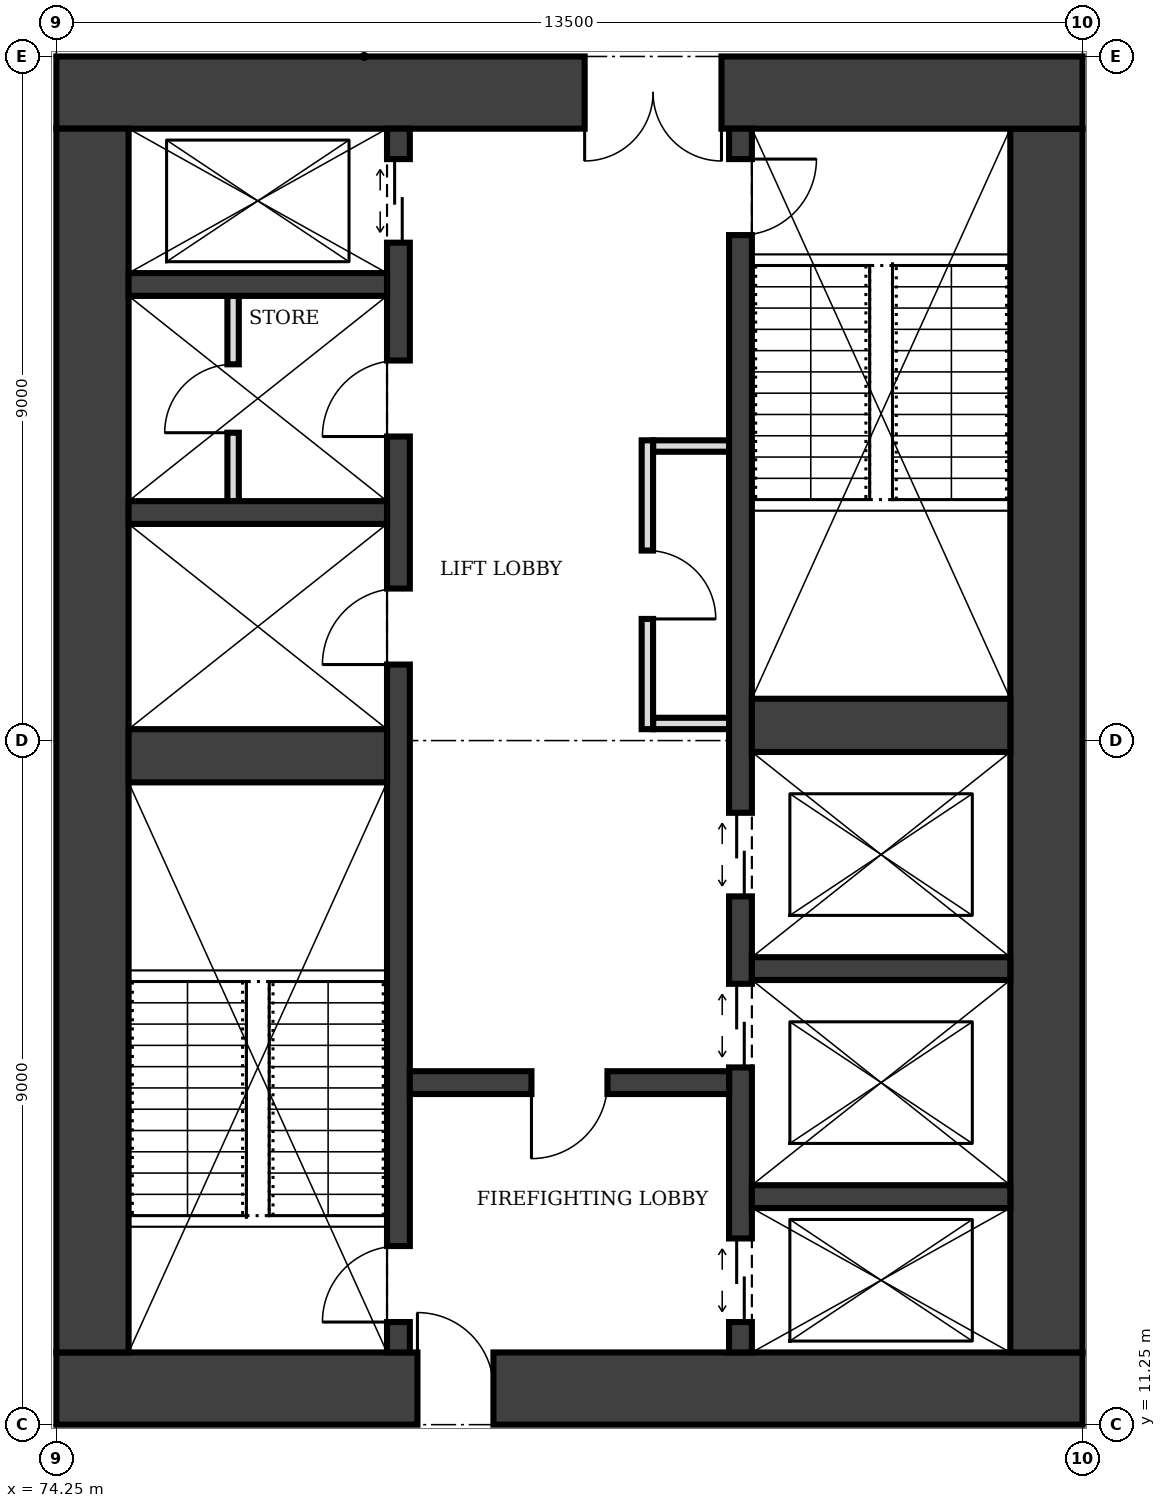
"""IFC4 building model, lengths in metres.
Left out: names, types, materials, properties, quantities, classifications, styles, units other than length and angle.
Written with IfcOpenShell. Run it as: python <this file> out.ifc"""

import sys

from ifc_helpers import new_model, si_unit, direction, frame, frame_2d, origin, place, context, subcontext, project, spatial, rectangle, extrude, element, fill, save


model = new_model("IFC4")
c1 = context("Model", 3, precision=1e-05, world=origin(), true_north=direction((0.0, 1.0)))
c2 = subcontext(c1, "Body", "Model", "MODEL_VIEW")
j1 = project(units=[si_unit("LENGTHUNIT", "METRE"), si_unit("PLANEANGLEUNIT", "RADIAN")], contexts=[c1])
p1 = place(None, origin())
s1 = spatial("IfcSite", under=j1, at=p1, CompositionType="ELEMENT")
p2 = place(p1, origin())
s2 = spatial("IfcBuilding", under=s1, at=p2, CompositionType="ELEMENT")
p3 = place(p2, frame((0.0, 0.0, 205.0)))
s3 = spatial("IfcBuildingStorey", under=s2, at=p3, CompositionType="ELEMENT", Elevation=205.0)
p4 = place(p3, frame((74.25, 11.725, 0.0), z_axis=(0.0, 0.0, 1.0), x_axis=(1.0, 0.0, 0.0)))
e1 = element("IfcWall", 1, at=p4, inside=s3, PredefinedType="SHEAR", context=c2, shape_type="SweptSolid", body=[
    extrude(rectangle(XDim=13.5, YDim=0.95, at=frame_2d((6.75, 0.0))), origin(), (0.0, 0.0, 1.0), 4.0),
])
p5 = place(p4, frame((4.75, 0.0, 0.0)))
e2 = element("IfcOpeningElement", 2, at=p5, cuts=e1, PredefinedType="OPENING", context=c2, shape_type="SweptSolid", body=[
    extrude(rectangle(XDim=1.0, YDim=2.1, at=frame_2d((0.5, 1.05))), frame((0.0, 0.485, 0.0), z_axis=(0.0, -1.0, 0.0), x_axis=(1.0, 0.0, 0.0)), (0.0, 0.0, 1.0), 0.97),
])
p6 = place(p3, frame((87.275, 12.2, 0.0), z_axis=(0.0, 0.0, 1.0), x_axis=(0.0, 1.0, 0.0)))
e3 = element("IfcWall", 3, at=p6, inside=s3, PredefinedType="SHEAR", context=c2, shape_type="SweptSolid", body=[
    extrude(rectangle(XDim=16.1, YDim=0.95, at=frame_2d((8.05, 0.0))), origin(), (0.0, 0.0, 1.0), 4.0),
])
p7 = place(p3, frame((87.75, 28.775, 0.0), z_axis=(0.0, 0.0, 1.0), x_axis=(-1.0, 0.0, 0.0)))
e4 = element("IfcWall", 4, at=p7, inside=s3, PredefinedType="SHEAR", context=c2, shape_type="SweptSolid", body=[
    extrude(rectangle(XDim=13.5, YDim=0.95, at=frame_2d((6.75, 0.0))), origin(), (0.0, 0.0, 1.0), 4.0),
])
p8 = place(p7, frame((4.75, 0.0, 0.0)))
e5 = element("IfcOpeningElement", 5, at=p8, cuts=e4, PredefinedType="OPENING", context=c2, shape_type="SweptSolid", body=[
    extrude(rectangle(XDim=1.8, YDim=2.1, at=frame_2d((0.9, 1.05))), frame((0.0, 0.485, 0.0), z_axis=(0.0, -1.0, 0.0), x_axis=(1.0, 0.0, 0.0)), (0.0, 0.0, 1.0), 0.97),
])
p9 = place(p3, frame((74.725, 28.3, 0.0), z_axis=(0.0, 0.0, 1.0), x_axis=(0.0, -1.0, 0.0)))
e6 = element("IfcWall", 6, at=p9, inside=s3, PredefinedType="SHEAR", context=c2, shape_type="SweptSolid", body=[
    extrude(rectangle(XDim=16.1, YDim=0.95, at=frame_2d((8.05, 0.0))), origin(), (0.0, 0.0, 1.0), 4.0),
])
p10 = place(p3, frame((78.75, 12.2, 0.0), z_axis=(0.0, 0.0, 1.0), x_axis=(0.0, 1.0, 0.0)))
e7 = element("IfcWall", 7, at=p10, inside=s3, PredefinedType="SHEAR", context=c2, shape_type="SweptSolid", body=[
    extrude(rectangle(XDim=16.1, YDim=0.3, at=frame_2d((8.05, 0.0))), origin(), (0.0, 0.0, 1.0), 4.0),
])
p11 = place(p10, frame((0.4, 0.0, 0.0)))
e8 = element("IfcOpeningElement", 8, at=p11, cuts=e7, PredefinedType="OPENING", context=c2, shape_type="SweptSolid", body=[
    extrude(rectangle(XDim=1.0, YDim=2.1, at=frame_2d((0.5, 1.05))), frame((0.0, 0.16, 0.0), z_axis=(0.0, -1.0, 0.0), x_axis=(1.0, 0.0, 0.0)), (0.0, 0.0, 1.0), 0.32),
])
p12 = place(p10, frame((14.6, 0.0, 0.0)))
e9 = element("IfcOpeningElement", 9, at=p12, cuts=e7, PredefinedType="OPENING", context=c2, shape_type="SweptSolid", body=[
    extrude(rectangle(XDim=1.1, YDim=2.1, at=frame_2d((0.55, 1.05))), frame((0.0, 0.16, 0.0), z_axis=(0.0, -1.0, 0.0), x_axis=(1.0, 0.0, 0.0)), (0.0, 0.0, 1.0), 0.32),
])
p13 = place(p10, frame((9.05, 0.0, 0.0)))
e10 = element("IfcOpeningElement", 10, at=p13, cuts=e7, PredefinedType="OPENING", context=c2, shape_type="SweptSolid", body=[
    extrude(rectangle(XDim=1.0, YDim=2.1, at=frame_2d((0.5, 1.05))), frame((0.0, 0.16, 0.0), z_axis=(0.0, -1.0, 0.0), x_axis=(1.0, 0.0, 0.0)), (0.0, 0.0, 1.0), 0.32),
])
p14 = place(p10, frame((12.05, 0.0, 0.0)))
e11 = element("IfcOpeningElement", 11, at=p14, cuts=e7, PredefinedType="OPENING", context=c2, shape_type="SweptSolid", body=[
    extrude(rectangle(XDim=1.0, YDim=2.1, at=frame_2d((0.5, 1.05))), frame((0.0, 0.16, 0.0), z_axis=(0.0, -1.0, 0.0), x_axis=(1.0, 0.0, 0.0)), (0.0, 0.0, 1.0), 0.32),
])
p15 = place(p3, frame((83.25, 12.2, 0.0), z_axis=(0.0, 0.0, 1.0), x_axis=(0.0, 1.0, 0.0)))
e12 = element("IfcWall", 12, at=p15, inside=s3, PredefinedType="SHEAR", context=c2, shape_type="SweptSolid", body=[
    extrude(rectangle(XDim=16.1, YDim=0.3, at=frame_2d((8.05, 0.0))), origin(), (0.0, 0.0, 1.0), 4.0),
])
p16 = place(p15, frame((14.7, 0.0, 0.0)))
e13 = element("IfcOpeningElement", 13, at=p16, cuts=e12, PredefinedType="OPENING", context=c2, shape_type="SweptSolid", body=[
    extrude(rectangle(XDim=1.0, YDim=2.1, at=frame_2d((0.5, 1.05))), frame((0.0, 0.16, 0.0), z_axis=(0.0, -1.0, 0.0), x_axis=(1.0, 0.0, 0.0)), (0.0, 0.0, 1.0), 0.32),
])
p17 = place(p15, frame((0.4, 0.0, 0.0)))
e14 = element("IfcOpeningElement", 14, at=p17, cuts=e12, PredefinedType="OPENING", context=c2, shape_type="SweptSolid", body=[
    extrude(rectangle(XDim=1.1, YDim=2.1, at=frame_2d((0.55, 1.05))), frame((0.0, 0.16, 0.0), z_axis=(0.0, -1.0, 0.0), x_axis=(1.0, 0.0, 0.0)), (0.0, 0.0, 1.0), 0.32),
])
p18 = place(p15, frame((3.75, 0.0, 0.0)))
e15 = element("IfcOpeningElement", 15, at=p18, cuts=e12, PredefinedType="OPENING", context=c2, shape_type="SweptSolid", body=[
    extrude(rectangle(XDim=1.1, YDim=2.1, at=frame_2d((0.55, 1.05))), frame((0.0, 0.16, 0.0), z_axis=(0.0, -1.0, 0.0), x_axis=(1.0, 0.0, 0.0)), (0.0, 0.0, 1.0), 0.32),
])
p19 = place(p15, frame((6.0, 0.0, 0.0)))
e16 = element("IfcOpeningElement", 16, at=p19, cuts=e12, PredefinedType="OPENING", context=c2, shape_type="SweptSolid", body=[
    extrude(rectangle(XDim=1.1, YDim=2.1, at=frame_2d((0.55, 1.05))), frame((0.0, 0.16, 0.0), z_axis=(0.0, -1.0, 0.0), x_axis=(1.0, 0.0, 0.0)), (0.0, 0.0, 1.0), 0.32),
])
p20 = place(p3, frame((75.2, 20.05, 0.0), z_axis=(0.0, 0.0, 1.0), x_axis=(1.0, 0.0, 0.0)))
e17 = element("IfcWall", 17, at=p20, inside=s3, PredefinedType="SHEAR", context=c2, shape_type="SweptSolid", body=[
    extrude(rectangle(XDim=3.4, YDim=0.7, at=frame_2d((1.7, 0.0))), origin(), (0.0, 0.0, 1.0), 4.0),
])
p21 = place(p3, frame((78.9, 15.75, 0.0), z_axis=(0.0, 0.0, 1.0), x_axis=(1.0, 0.0, 0.0)))
e18 = element("IfcWall", 18, at=p21, inside=s3, PredefinedType="SHEAR", context=c2, shape_type="SweptSolid", body=[
    extrude(rectangle(XDim=4.2, YDim=0.3, at=frame_2d((2.1, 0.0))), origin(), (0.0, 0.0, 1.0), 4.0),
])
p22 = place(p21, frame((1.6, 0.0, 0.0)))
e19 = element("IfcOpeningElement", 19, at=p22, cuts=e18, PredefinedType="OPENING", context=c2, shape_type="SweptSolid", body=[
    extrude(rectangle(XDim=1.0, YDim=2.1, at=frame_2d((0.5, 1.05))), frame((0.0, 0.16, 0.0), z_axis=(0.0, -1.0, 0.0), x_axis=(1.0, 0.0, 0.0)), (0.0, 0.0, 1.0), 0.32),
])
for number, where, z_axis, x_axis in (
    (20, (83.4, 14.25, 0.0), (0.0, 0.0, 1.0), (1.0, 0.0, 0.0)),
    (21, (83.4, 17.25, 0.0), (0.0, 0.0, 1.0), (1.0, 0.0, 0.0)),
):
    element("IfcWall", number, at=place(p3, frame(where, z_axis=z_axis, x_axis=x_axis)), inside=s3, PredefinedType="SHEAR", context=c2, shape_type="SweptSolid", body=[
        extrude(rectangle(XDim=3.4, YDim=0.3, at=frame_2d((1.7, 0.0))), origin(), (0.0, 0.0, 1.0), 4.0),
    ])
p23 = place(p3, frame((83.4, 20.45, 0.0), z_axis=(0.0, 0.0, 1.0), x_axis=(1.0, 0.0, 0.0)))
e22 = element("IfcWall", 22, at=p23, inside=s3, PredefinedType="SHEAR", context=c2, shape_type="SweptSolid", body=[
    extrude(rectangle(XDim=3.4, YDim=0.7, at=frame_2d((1.7, 0.0))), origin(), (0.0, 0.0, 1.0), 4.0),
])
for number, where, z_axis, x_axis in (
    (23, (75.2, 23.25, 0.0), (0.0, 0.0, 1.0), (1.0, 0.0, 0.0)),
    (24, (75.2, 26.25, 0.0), (0.0, 0.0, 1.0), (1.0, 0.0, 0.0)),
):
    element("IfcWall", number, at=place(p3, frame(where, z_axis=z_axis, x_axis=x_axis)), inside=s3, PredefinedType="SHEAR", context=c2, shape_type="SweptSolid", body=[
        extrude(rectangle(XDim=3.4, YDim=0.3, at=frame_2d((1.7, 0.0))), origin(), (0.0, 0.0, 1.0), 4.0),
    ])
p24 = place(p3, frame((82.025, 20.4, 0.0), z_axis=(0.0, 0.0, 1.0), x_axis=(0.0, 1.0, 0.0)))
e25 = element("IfcWall", 25, at=p24, inside=s3, PredefinedType="PARTITIONING", context=c2, shape_type="SweptSolid", body=[
    extrude(rectangle(XDim=3.8, YDim=0.15, at=frame_2d((1.9, 0.0))), origin(), (0.0, 0.0, 1.0), 3.75),
])
p25 = place(p24, frame((1.45, 0.0, 0.0)))
e26 = element("IfcOpeningElement", 26, at=p25, cuts=e25, PredefinedType="OPENING", context=c2, shape_type="SweptSolid", body=[
    extrude(rectangle(XDim=0.9, YDim=2.1, at=frame_2d((0.45, 1.05))), frame((0.0, 0.085, 0.0), z_axis=(0.0, -1.0, 0.0), x_axis=(1.0, 0.0, 0.0)), (0.0, 0.0, 1.0), 0.17),
])
for number, where, z_axis, x_axis in (
    (27, (82.1, 20.475, 0.0), (0.0, 0.0, 1.0), (1.0, 0.0, 0.0)),
    (28, (82.1, 24.125, 0.0), (0.0, 0.0, 1.0), (1.0, 0.0, 0.0)),
):
    element("IfcWall", number, at=place(p3, frame(where, z_axis=z_axis, x_axis=x_axis)), inside=s3, PredefinedType="PARTITIONING", context=c2, shape_type="SweptSolid", body=[
        extrude(rectangle(XDim=1.0, YDim=0.15, at=frame_2d((0.5, 0.0))), origin(), (0.0, 0.0, 1.0), 3.75),
    ])
p26 = place(p3, frame((76.575, 23.4, 0.0), z_axis=(0.0, 0.0, 1.0), x_axis=(0.0, 1.0, 0.0)))
e29 = element("IfcWall", 29, at=p26, inside=s3, PredefinedType="PARTITIONING", context=c2, shape_type="SweptSolid", body=[
    extrude(rectangle(XDim=2.7, YDim=0.15, at=frame_2d((1.35, 0.0))), origin(), (0.0, 0.0, 1.0), 3.75),
])
p27 = place(p26, frame((0.9, 0.0, 0.0)))
e30 = element("IfcOpeningElement", 30, at=p27, cuts=e29, PredefinedType="OPENING", context=c2, shape_type="SweptSolid", body=[
    extrude(rectangle(XDim=0.9, YDim=2.1, at=frame_2d((0.45, 1.05))), frame((0.0, 0.085, 0.0), z_axis=(0.0, -1.0, 0.0), x_axis=(1.0, 0.0, 0.0)), (0.0, 0.0, 1.0), 0.17),
])
p28 = place(p5, origin())
e31 = element("IfcDoor", 31, at=p28, inside=s3, OperationType="SINGLE_SWING_LEFT", PredefinedType="DOOR", context=c2, shape_type="SweptSolid", body=[
    extrude(rectangle(XDim=1.0, YDim=2.1, at=frame_2d((0.5, 1.05))), frame((0.0, 0.025, 0.0), z_axis=(0.0, -1.0, 0.0), x_axis=(1.0, 0.0, 0.0)), (0.0, 0.0, 1.0), 0.05),
])
fill(e2, e31)
p29 = place(p8, origin())
e32 = element("IfcDoor", 32, at=p29, inside=s3, OperationType="DOUBLE_DOOR_SINGLE_SWING", PredefinedType="DOOR", context=c2, shape_type="SweptSolid", body=[
    extrude(rectangle(XDim=1.8, YDim=2.1, at=frame_2d((0.9, 1.05))), frame((0.0, 0.025, 0.0), z_axis=(0.0, -1.0, 0.0), x_axis=(1.0, 0.0, 0.0)), (0.0, 0.0, 1.0), 0.05),
])
fill(e5, e32)
p30 = place(p22, frame((1.0, 0.0, 0.0), z_axis=(0.0, 0.0, 1.0), x_axis=(-1.0, 0.0, 0.0)))
e33 = element("IfcDoor", 33, at=p30, inside=s3, OperationType="SINGLE_SWING_RIGHT", PredefinedType="DOOR", context=c2, shape_type="SweptSolid", body=[
    extrude(rectangle(XDim=1.0, YDim=2.1, at=frame_2d((0.5, 1.05))), frame((0.0, 0.025, 0.0), z_axis=(0.0, -1.0, 0.0), x_axis=(1.0, 0.0, 0.0)), (0.0, 0.0, 1.0), 0.05),
])
fill(e19, e33)
p31 = place(p11, origin())
e34 = element("IfcDoor", 34, at=p31, inside=s3, OperationType="SINGLE_SWING_LEFT", PredefinedType="DOOR", context=c2, shape_type="SweptSolid", body=[
    extrude(rectangle(XDim=1.0, YDim=2.1, at=frame_2d((0.5, 1.05))), frame((0.0, 0.025, 0.0), z_axis=(0.0, -1.0, 0.0), x_axis=(1.0, 0.0, 0.0)), (0.0, 0.0, 1.0), 0.05),
])
fill(e8, e34)
p32 = place(p16, frame((1.0, 0.0, 0.0), z_axis=(0.0, 0.0, 1.0), x_axis=(-1.0, 0.0, 0.0)))
e35 = element("IfcDoor", 35, at=p32, inside=s3, OperationType="SINGLE_SWING_LEFT", PredefinedType="DOOR", context=c2, shape_type="SweptSolid", body=[
    extrude(rectangle(XDim=1.0, YDim=2.1, at=frame_2d((0.5, 1.05))), frame((0.0, 0.025, 0.0), z_axis=(0.0, -1.0, 0.0), x_axis=(1.0, 0.0, 0.0)), (0.0, 0.0, 1.0), 0.05),
])
fill(e13, e35)
p33 = place(p17, origin())
e36 = element("IfcDoor", 36, at=p33, inside=s3, OperationType="DOUBLE_DOOR_SLIDING", PredefinedType="DOOR", context=c2, shape_type="SweptSolid", body=[
    extrude(rectangle(XDim=1.1, YDim=2.1, at=frame_2d((0.55, 1.05))), frame((0.0, 0.025, 0.0), z_axis=(0.0, -1.0, 0.0), x_axis=(1.0, 0.0, 0.0)), (0.0, 0.0, 1.0), 0.05),
])
fill(e14, e36)
p34 = place(p12, origin())
e37 = element("IfcDoor", 37, at=p34, inside=s3, OperationType="DOUBLE_DOOR_SLIDING", PredefinedType="DOOR", context=c2, shape_type="SweptSolid", body=[
    extrude(rectangle(XDim=1.1, YDim=2.1, at=frame_2d((0.55, 1.05))), frame((0.0, 0.025, 0.0), z_axis=(0.0, -1.0, 0.0), x_axis=(1.0, 0.0, 0.0)), (0.0, 0.0, 1.0), 0.05),
])
fill(e9, e37)
p35 = place(p18, origin())
e38 = element("IfcDoor", 38, at=p35, inside=s3, OperationType="DOUBLE_DOOR_SLIDING", PredefinedType="DOOR", context=c2, shape_type="SweptSolid", body=[
    extrude(rectangle(XDim=1.1, YDim=2.1, at=frame_2d((0.55, 1.05))), frame((0.0, 0.025, 0.0), z_axis=(0.0, -1.0, 0.0), x_axis=(1.0, 0.0, 0.0)), (0.0, 0.0, 1.0), 0.05),
])
fill(e15, e38)
p36 = place(p19, origin())
e39 = element("IfcDoor", 39, at=p36, inside=s3, OperationType="DOUBLE_DOOR_SLIDING", PredefinedType="DOOR", context=c2, shape_type="SweptSolid", body=[
    extrude(rectangle(XDim=1.1, YDim=2.1, at=frame_2d((0.55, 1.05))), frame((0.0, 0.025, 0.0), z_axis=(0.0, -1.0, 0.0), x_axis=(1.0, 0.0, 0.0)), (0.0, 0.0, 1.0), 0.05),
])
fill(e16, e39)
p37 = place(p25, frame((0.9, 0.0, 0.0), z_axis=(0.0, 0.0, 1.0), x_axis=(-1.0, 0.0, 0.0)))
e40 = element("IfcDoor", 40, at=p37, inside=s3, OperationType="SINGLE_SWING_RIGHT", PredefinedType="DOOR", context=c2, shape_type="SweptSolid", body=[
    extrude(rectangle(XDim=0.9, YDim=2.1, at=frame_2d((0.45, 1.05))), frame((0.0, 0.025, 0.0), z_axis=(0.0, -1.0, 0.0), x_axis=(1.0, 0.0, 0.0)), (0.0, 0.0, 1.0), 0.05),
])
fill(e26, e40)
p38 = place(p13, origin())
e41 = element("IfcDoor", 41, at=p38, inside=s3, OperationType="SINGLE_SWING_LEFT", PredefinedType="DOOR", context=c2, shape_type="SweptSolid", body=[
    extrude(rectangle(XDim=1.0, YDim=2.1, at=frame_2d((0.5, 1.05))), frame((0.0, 0.025, 0.0), z_axis=(0.0, -1.0, 0.0), x_axis=(1.0, 0.0, 0.0)), (0.0, 0.0, 1.0), 0.05),
])
fill(e10, e41)
p39 = place(p14, origin())
e42 = element("IfcDoor", 42, at=p39, inside=s3, OperationType="SINGLE_SWING_LEFT", PredefinedType="DOOR", context=c2, shape_type="SweptSolid", body=[
    extrude(rectangle(XDim=1.0, YDim=2.1, at=frame_2d((0.5, 1.05))), frame((0.0, 0.025, 0.0), z_axis=(0.0, -1.0, 0.0), x_axis=(1.0, 0.0, 0.0)), (0.0, 0.0, 1.0), 0.05),
])
fill(e11, e42)
p40 = place(p27, origin())
e43 = element("IfcDoor", 43, at=p40, inside=s3, OperationType="SINGLE_SWING_LEFT", PredefinedType="DOOR", context=c2, shape_type="SweptSolid", body=[
    extrude(rectangle(XDim=0.9, YDim=2.1, at=frame_2d((0.45, 1.05))), frame((0.0, 0.025, 0.0), z_axis=(0.0, -1.0, 0.0), x_axis=(1.0, 0.0, 0.0)), (0.0, 0.0, 1.0), 0.05),
])
fill(e30, e43)
save(model, sys.argv[1])
